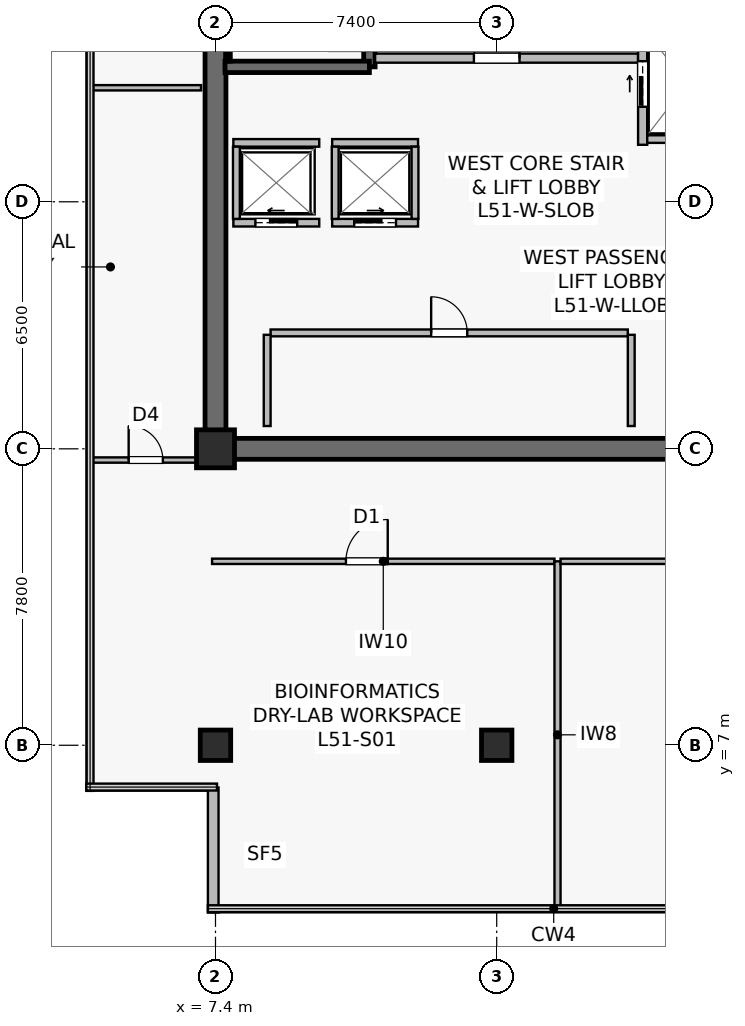
"""IFC4 building model, lengths in metres.
Left out: names, types, materials, properties, quantities, classifications, styles, units other than length and angle.
Written with IfcOpenShell. Run it as: python <this file> out.ifc"""

import sys

from ifc_helpers import new_model, si_unit, direction, frame, frame_2d, origin, origin_2d, place, context, subcontext, project, spatial, rectangle, extrude, source, transform, mapped, element, fill, save


model = new_model("IFC4")
c1 = context("Model", 3, precision=1e-05, world=origin(), true_north=direction((0.0, 1.0)))
c2 = subcontext(c1, "Body", "Model", "MODEL_VIEW")
j1 = project(units=[si_unit("LENGTHUNIT", "METRE"), si_unit("PLANEANGLEUNIT", "RADIAN")], contexts=[c1])
p1 = place(None, origin())
s1 = spatial("IfcSite", under=j1, at=p1, CompositionType="ELEMENT")
p2 = place(p1, origin())
s2 = spatial("IfcBuilding", under=s1, at=p2, CompositionType="ELEMENT")
p3 = place(p2, frame((0.0, 0.0, 213.7)))
s3 = spatial("IfcBuildingStorey", under=s2, at=p3, CompositionType="ELEMENT", Elevation=213.7)
p4 = place(p3, frame((7.125, 14.8, 0.0), z_axis=(0.0, 0.0, 1.0), x_axis=(1.0, 0.0, 0.0)))
e1 = element("IfcWall", 1, at=p4, inside=s3, PredefinedType="SHEAR", context=c2, shape_type="SweptSolid", body=[
    extrude(rectangle(XDim=15.35, YDim=0.55, at=frame_2d((7.675, 0.0))), origin(), (0.0, 0.0, 1.0), 3.8),
])
p5 = place(p3, frame((7.4, 15.075, 0.0), z_axis=(0.0, 0.0, 1.0), x_axis=(0.0, 1.0, 0.0)))
e2 = element("IfcWall", 2, at=p5, inside=s3, PredefinedType="SHEAR", context=c2, shape_type="SweptSolid", body=[
    extrude(rectangle(XDim=18.45, YDim=0.55, at=frame_2d((9.225, 0.0))), origin(), (0.0, 0.0, 1.0), 3.8),
])
p6 = place(p3, frame((11.45, 24.85, 0.0), z_axis=(0.0, 0.0, 1.0), x_axis=(0.0, 1.0, 0.0)))
e3 = element("IfcWall", 3, at=p6, inside=s3, PredefinedType="SHEAR", context=c2, shape_type="SweptSolid", body=[
    extrude(rectangle(XDim=8.63, YDim=0.3, at=frame_2d((4.315, 0.0))), origin(), (0.0, 0.0, 1.0), 3.8),
])
p7 = place(p6, frame((0.42, 0.0, 0.0)))
e4 = element("IfcOpeningElement", 4, at=p7, cuts=e3, PredefinedType="OPENING", context=c2, shape_type="SweptSolid", body=[
    extrude(rectangle(XDim=1.1, YDim=2.15, at=frame_2d((0.55, 1.075))), frame((0.0, 0.16, 0.0), z_axis=(0.0, -1.0, 0.0), x_axis=(1.0, 0.0, 0.0)), (0.0, 0.0, 1.0), 0.32),
])
p8 = place(p3, frame((7.65, 24.85, 0.0), z_axis=(0.0, 0.0, 1.0), x_axis=(1.0, 0.0, 0.0)))
e5 = element("IfcWall", 5, at=p8, inside=s3, PredefinedType="SHEAR", context=c2, shape_type="SweptSolid", body=[
    extrude(rectangle(XDim=3.8, YDim=0.3, at=frame_2d((1.9, 0.0))), origin(), (0.0, 0.0, 1.0), 3.8),
])
p9 = place(p3, frame((7.73, 25.0, 0.0), z_axis=(0.0, 0.0, 1.0), x_axis=(0.0, 1.0, 0.0)))
e6 = element("IfcWall", 6, at=p9, inside=s3, PredefinedType="SOLIDWALL", context=c2, shape_type="SweptSolid", body=[
    extrude(rectangle(XDim=8.32, YDim=0.12, at=frame_2d((4.16, 0.0))), origin(), (0.0, 0.0, 1.0), 3.8),
])
m1 = source(origin(), c2, "Body", "SweptSolid", [
    extrude(rectangle(XDim=0.8, YDim=0.8, at=origin_2d()), origin(), (0.0, 0.0, 1.0), 4.1),
])
p10 = place(p3, frame((14.8, 7.0, 0.0), z_axis=(0.0, 0.0, 1.0), x_axis=(1.0, 0.0, 0.0)))
e7 = element("IfcColumn", 7, at=p10, inside=s3, PredefinedType="COLUMN", context=c2, shape_type="MappedRepresentation", body=[
    mapped(m1, transform((0.0, 0.0, 0.0), scale=1.0)),
])
m2 = source(origin(), c2, "Body", "SweptSolid", [
    extrude(rectangle(XDim=1.0, YDim=1.0, at=origin_2d()), origin(), (0.0, 0.0, 1.0), 4.1),
])
p11 = place(p3, frame((7.4, 14.8, 0.0), z_axis=(0.0, 0.0, 1.0), x_axis=(1.0, 0.0, 0.0)))
e8 = element("IfcColumn", 8, at=p11, inside=s3, PredefinedType="COLUMN", context=c2, shape_type="MappedRepresentation", body=[
    mapped(m2, transform((0.0, 0.0, 0.0), scale=1.0)),
])
p12 = place(p3, frame((7.4, 7.0, 0.0), z_axis=(0.0, 0.0, 1.0), x_axis=(1.0, 0.0, 0.0)))
e9 = element("IfcColumn", 9, at=p12, inside=s3, PredefinedType="COLUMN", context=c2, shape_type="MappedRepresentation", body=[
    mapped(m1, transform((0.0, 0.0, 0.0), scale=1.0)),
])
p13 = place(p3, frame((7.34, 5.888, 0.0), z_axis=(0.0, 0.0, 1.0), x_axis=(0.0, -1.0, 0.0)))
e10 = element("IfcWall", 10, at=p13, inside=s3, PredefinedType="STANDARD", context=c2, shape_type="SweptSolid", body=[
    extrude(rectangle(XDim=3.288, YDim=0.28, at=frame_2d((1.644, 0.0))), origin(), (0.0, 0.0, 1.0), 3.8),
])
p14 = place(p3, frame((11.6, 25.08, 0.0), z_axis=(0.0, 0.0, 1.0), x_axis=(1.0, 0.0, 0.0)))
e11 = element("IfcWall", 11, at=p14, inside=s3, PredefinedType="SOLIDWALL", context=c2, shape_type="SweptSolid", body=[
    extrude(rectangle(XDim=6.92, YDim=0.24, at=frame_2d((3.46, 0.0))), origin(), (0.0, 0.0, 1.0), 3.197),
])
p15 = place(p14, frame((2.6, 0.0, 0.0)))
e12 = element("IfcOpeningElement", 12, at=p15, cuts=e11, PredefinedType="OPENING", context=c2, shape_type="SweptSolid", body=[
    extrude(rectangle(XDim=1.2, YDim=2.16, at=frame_2d((0.6, 1.08))), frame((0.0, 0.13, 0.0), z_axis=(0.0, -1.0, 0.0), x_axis=(1.0, 0.0, 0.0)), (0.0, 0.0, 1.0), 0.26),
])
p16 = place(p3, frame((18.64, 22.8, 0.0), z_axis=(0.0, 0.0, 1.0), x_axis=(0.0, 1.0, 0.0)))
e13 = element("IfcWall", 13, at=p16, inside=s3, PredefinedType="SOLIDWALL", context=c2, shape_type="SweptSolid", body=[
    extrude(rectangle(XDim=6.85, YDim=0.24, at=frame_2d((3.425, 0.0))), origin(), (0.0, 0.0, 1.0), 2.935),
])
p17 = place(p16, frame((4.85, 0.0, 0.0)))
e14 = element("IfcOpeningElement", 14, at=p17, cuts=e13, PredefinedType="OPENING", context=c2, shape_type="SweptSolid", body=[
    extrude(rectangle(XDim=1.1, YDim=2.22, at=frame_2d((0.55, 1.11))), frame((0.0, 0.13, 0.0), z_axis=(0.0, -1.0, 0.0), x_axis=(1.0, 0.0, 0.0)), (0.0, 0.0, 1.0), 0.26),
])
p18 = place(p16, frame((1.0, 0.0, 0.0)))
e15 = element("IfcOpeningElement", 15, at=p18, cuts=e13, PredefinedType="OPENING", context=c2, shape_type="SweptSolid", body=[
    extrude(rectangle(XDim=1.2, YDim=2.22, at=frame_2d((0.6, 1.11))), frame((0.0, 0.13, 0.0), z_axis=(0.0, -1.0, 0.0), x_axis=(1.0, 0.0, 0.0)), (0.0, 0.0, 1.0), 0.26),
])
p19 = place(p3, frame((7.87, 20.75, 0.0), z_axis=(0.0, 0.0, 1.0), x_axis=(1.0, 0.0, 0.0)))
e16 = element("IfcWall", 16, at=p19, inside=s3, PredefinedType="SOLIDWALL", context=c2, shape_type="SweptSolid", body=[
    extrude(rectangle(XDim=2.26, YDim=0.2, at=frame_2d((1.13, 0.0))), origin(), (0.0, 0.0, 1.0), 3.8),
])
p20 = place(p19, frame((0.58, 0.0, 0.0)))
e17 = element("IfcOpeningElement", 17, at=p20, cuts=e16, PredefinedType="OPENING", context=c2, shape_type="SweptSolid", body=[
    extrude(rectangle(XDim=1.1, YDim=2.22, at=frame_2d((0.55, 1.11))), frame((0.0, 0.11, 0.0), z_axis=(0.0, -1.0, 0.0), x_axis=(1.0, 0.0, 0.0)), (0.0, 0.0, 1.0), 0.22),
])
p21 = place(p3, frame((7.87, 22.85, 0.0), z_axis=(0.0, 0.0, 1.0), x_axis=(1.0, 0.0, 0.0)))
e18 = element("IfcWall", 18, at=p21, inside=s3, PredefinedType="SOLIDWALL", context=c2, shape_type="SweptSolid", body=[
    extrude(rectangle(XDim=2.26, YDim=0.2, at=frame_2d((1.13, 0.0))), origin(), (0.0, 0.0, 1.0), 3.8),
])
p22 = place(p3, frame((7.95, 20.85, 0.0), z_axis=(0.0, 0.0, 1.0), x_axis=(0.0, 1.0, 0.0)))
e19 = element("IfcWall", 19, at=p22, inside=s3, PredefinedType="SOLIDWALL", context=c2, shape_type="SweptSolid", body=[
    extrude(rectangle(XDim=1.9, YDim=0.18, at=frame_2d((0.95, 0.0))), origin(), (0.0, 0.0, 1.0), 3.8),
])
p23 = place(p3, frame((10.47, 20.75, 0.0), z_axis=(0.0, 0.0, 1.0), x_axis=(1.0, 0.0, 0.0)))
e20 = element("IfcWall", 20, at=p23, inside=s3, PredefinedType="SOLIDWALL", context=c2, shape_type="SweptSolid", body=[
    extrude(rectangle(XDim=2.26, YDim=0.2, at=frame_2d((1.13, 0.0))), origin(), (0.0, 0.0, 1.0), 3.8),
])
p24 = place(p23, frame((0.58, 0.0, 0.0)))
e21 = element("IfcOpeningElement", 21, at=p24, cuts=e20, PredefinedType="OPENING", context=c2, shape_type="SweptSolid", body=[
    extrude(rectangle(XDim=1.1, YDim=2.22, at=frame_2d((0.55, 1.11))), frame((0.0, 0.11, 0.0), z_axis=(0.0, -1.0, 0.0), x_axis=(1.0, 0.0, 0.0)), (0.0, 0.0, 1.0), 0.22),
])
p25 = place(p3, frame((10.47, 22.85, 0.0), z_axis=(0.0, 0.0, 1.0), x_axis=(1.0, 0.0, 0.0)))
e22 = element("IfcWall", 22, at=p25, inside=s3, PredefinedType="SOLIDWALL", context=c2, shape_type="SweptSolid", body=[
    extrude(rectangle(XDim=2.26, YDim=0.2, at=frame_2d((1.13, 0.0))), origin(), (0.0, 0.0, 1.0), 3.8),
])
for number, where, z_axis, x_axis in (
    (23, (10.55, 20.85, 0.0), (0.0, 0.0, 1.0), (0.0, 1.0, 0.0)),
    (24, (12.65, 20.85, 0.0), (0.0, 0.0, 1.0), (0.0, 1.0, 0.0)),
):
    element("IfcWall", number, at=place(p3, frame(where, z_axis=z_axis, x_axis=x_axis)), inside=s3, PredefinedType="SOLIDWALL", context=c2, shape_type="SweptSolid", body=[
        extrude(rectangle(XDim=1.9, YDim=0.18, at=frame_2d((0.95, 0.0))), origin(), (0.0, 0.0, 1.0), 3.8),
    ])
p26 = place(p3, frame((18.76, 22.95, 0.0), z_axis=(0.0, 0.0, 1.0), x_axis=(1.0, 0.0, 0.0)))
e25 = element("IfcWall", 25, at=p26, inside=s3, PredefinedType="SOLIDWALL", context=c2, shape_type="SweptSolid", body=[
    extrude(rectangle(XDim=2.19, YDim=0.2, at=frame_2d((1.095, 0.0))), origin(), (0.0, 0.0, 1.0), 3.8),
])
p27 = place(p3, frame((8.85, 17.85, 0.0), z_axis=(0.0, 0.0, 1.0), x_axis=(1.0, 0.0, 0.0)))
e26 = element("IfcWall", 26, at=p27, inside=s3, PredefinedType="SOLIDWALL", context=c2, shape_type="SweptSolid", body=[
    extrude(rectangle(XDim=9.4, YDim=0.18, at=frame_2d((4.7, 0.0))), origin(), (0.0, 0.0, 1.0), 3.197),
])
p28 = place(p27, frame((4.225, 0.0, 0.0)))
e27 = element("IfcOpeningElement", 27, at=p28, cuts=e26, PredefinedType="OPENING", context=c2, shape_type="SweptSolid", body=[
    extrude(rectangle(XDim=0.95, YDim=2.15, at=frame_2d((0.475, 1.075))), frame((0.0, 0.1, 0.0), z_axis=(0.0, -1.0, 0.0), x_axis=(1.0, 0.0, 0.0)), (0.0, 0.0, 1.0), 0.2),
])
for number, where, z_axis, x_axis in (
    (28, (18.34, 15.4, 0.0), (0.0, 0.0, 1.0), (0.0, 1.0, 0.0)),
    (29, (8.76, 15.4, 0.0), (0.0, 0.0, 1.0), (0.0, 1.0, 0.0)),
):
    element("IfcWall", number, at=place(p3, frame(where, z_axis=z_axis, x_axis=x_axis)), inside=s3, PredefinedType="SOLIDWALL", context=c2, shape_type="SweptSolid", body=[
        extrude(rectangle(XDim=2.4, YDim=0.18, at=frame_2d((1.2, 0.0))), origin(), (0.0, 0.0, 1.0), 3.8),
    ])
p29 = place(p3, frame((7.31, 11.84, 0.0), z_axis=(0.0, 0.0, 1.0), x_axis=(1.0, 0.0, 0.0)))
e30 = element("IfcWall", 30, at=p29, inside=s3, PredefinedType="PARTITIONING", context=c2, shape_type="SweptSolid", body=[
    extrude(rectangle(XDim=9.01, YDim=0.14, at=frame_2d((4.505, 0.0))), origin(), (0.0, 0.0, 1.0), 3.197),
])
p30 = place(p29, frame((3.522, 0.0, 0.0)))
e31 = element("IfcOpeningElement", 31, at=p30, cuts=e30, PredefinedType="OPENING", context=c2, shape_type="SweptSolid", body=[
    extrude(rectangle(XDim=1.1, YDim=2.18, at=frame_2d((0.55, 1.09))), frame((0.0, 0.08, 0.0), z_axis=(0.0, -1.0, 0.0), x_axis=(1.0, 0.0, 0.0)), (0.0, 0.0, 1.0), 0.16),
])
p31 = place(p3, frame((16.4, 2.71, 0.0), z_axis=(0.0, 0.0, 1.0), x_axis=(0.0, 1.0, 0.0)))
e32 = element("IfcWall", 32, at=p31, inside=s3, PredefinedType="PARTITIONING", context=c2, shape_type="SweptSolid", body=[
    extrude(rectangle(XDim=9.13, YDim=0.16, at=frame_2d((4.565, 0.0))), origin(), (0.0, 0.0, 1.0), 3.135),
])
p32 = place(p3, frame((16.48, 11.84, 0.0), z_axis=(0.0, 0.0, 1.0), x_axis=(1.0, 0.0, 0.0)))
e33 = element("IfcWall", 33, at=p32, inside=s3, PredefinedType="PARTITIONING", context=c2, shape_type="SweptSolid", body=[
    extrude(rectangle(XDim=18.64, YDim=0.14, at=frame_2d((9.32, 0.0))), origin(), (0.0, 0.0, 1.0), 3.197),
])
p33 = place(p32, frame((9.781, 0.0, 0.0)))
e34 = element("IfcOpeningElement", 34, at=p33, cuts=e33, PredefinedType="OPENING", context=c2, shape_type="SweptSolid", body=[
    extrude(rectangle(XDim=1.1, YDim=2.18, at=frame_2d((0.55, 1.09))), frame((0.0, 0.08, 0.0), z_axis=(0.0, -1.0, 0.0), x_axis=(1.0, 0.0, 0.0)), (0.0, 0.0, 1.0), 0.16),
])
p34 = place(p3, frame((4.11, 24.3, 0.0), z_axis=(0.0, 0.0, 1.0), x_axis=(1.0, 0.0, 0.0)))
e35 = element("IfcWall", 35, at=p34, inside=s3, PredefinedType="PARTITIONING", context=c2, shape_type="SweptSolid", body=[
    extrude(rectangle(XDim=2.91, YDim=0.14, at=frame_2d((1.455, 0.0))), origin(), (0.0, 0.0, 1.0), 3.8),
])
p35 = place(p3, frame((4.11, 14.505, 0.0), z_axis=(0.0, 0.0, 1.0), x_axis=(1.0, 0.0, 0.0)))
e36 = element("IfcWall", 36, at=p35, inside=s3, PredefinedType="PARTITIONING", context=c2, shape_type="SweptSolid", body=[
    extrude(rectangle(XDim=2.91, YDim=0.14, at=frame_2d((1.455, 0.0))), origin(), (0.0, 0.0, 1.0), 3.8),
])
p36 = place(p35, frame((1.005, 0.0, 0.0)))
e37 = element("IfcOpeningElement", 37, at=p36, cuts=e36, PredefinedType="OPENING", context=c2, shape_type="SweptSolid", body=[
    extrude(rectangle(XDim=0.9, YDim=2.1, at=frame_2d((0.45, 1.05))), frame((0.0, 0.08, 0.0), z_axis=(0.0, -1.0, 0.0), x_axis=(1.0, 0.0, 0.0)), (0.0, 0.0, 1.0), 0.16),
])
m3 = source(origin(), c2, "Body", "SweptSolid", [
    extrude(rectangle(XDim=1.2, YDim=2.16, at=frame_2d((0.6, 1.08))), frame((0.0, 0.025, 0.0), z_axis=(0.0, -1.0, 0.0), x_axis=(1.0, 0.0, 0.0)), (0.0, 0.0, 1.0), 0.05),
])
p37 = place(p15, origin())
e38 = element("IfcDoor", 38, at=p37, inside=s3, OperationType="SINGLE_SWING_RIGHT", PredefinedType="DOOR", context=c2, shape_type="MappedRepresentation", body=[
    mapped(m3, transform((0.0, 0.0, 0.0), scale=1.0)),
])
fill(e12, e38)
m4 = source(origin(), c2, "Body", "SweptSolid", [
    extrude(rectangle(XDim=1.1, YDim=2.22, at=frame_2d((0.55, 1.11))), frame((0.0, 0.025, 0.0), z_axis=(0.0, -1.0, 0.0), x_axis=(1.0, 0.0, 0.0)), (0.0, 0.0, 1.0), 0.05),
])
p38 = place(p20, origin())
e39 = element("IfcDoor", 39, at=p38, inside=s3, OperationType="SLIDING_TO_LEFT", PredefinedType="USERDEFINED", context=c2, shape_type="MappedRepresentation", body=[
    mapped(m4, transform((0.0, 0.0, 0.0), scale=1.0)),
])
fill(e17, e39)
p39 = place(p24, origin())
e40 = element("IfcDoor", 40, at=p39, inside=s3, OperationType="SLIDING_TO_RIGHT", PredefinedType="USERDEFINED", context=c2, shape_type="MappedRepresentation", body=[
    mapped(m4, transform((0.0, 0.0, 0.0), scale=1.0)),
])
fill(e21, e40)
m5 = source(origin(), c2, "Body", "SweptSolid", [
    extrude(rectangle(XDim=1.2, YDim=2.22, at=frame_2d((0.6, 1.11))), frame((0.0, 0.025, 0.0), z_axis=(0.0, -1.0, 0.0), x_axis=(1.0, 0.0, 0.0)), (0.0, 0.0, 1.0), 0.05),
])
p40 = place(p18, origin())
e41 = element("IfcDoor", 41, at=p40, inside=s3, OperationType="SLIDING_TO_RIGHT", PredefinedType="USERDEFINED", context=c2, shape_type="MappedRepresentation", body=[
    mapped(m5, transform((0.0, 0.0, 0.0), scale=1.0)),
])
fill(e15, e41)
m6 = source(origin(), c2, "Body", "SweptSolid", [
    extrude(rectangle(XDim=0.95, YDim=2.15, at=frame_2d((0.475, 1.075))), frame((0.0, 0.025, 0.0), z_axis=(0.0, -1.0, 0.0), x_axis=(1.0, 0.0, 0.0)), (0.0, 0.0, 1.0), 0.05),
])
p41 = place(p28, origin())
e42 = element("IfcDoor", 42, at=p41, inside=s3, OperationType="SINGLE_SWING_LEFT", PredefinedType="DOOR", context=c2, shape_type="MappedRepresentation", body=[
    mapped(m6, transform((0.0, 0.0, 0.0), scale=1.0)),
])
fill(e27, e42)
m7 = source(origin(), c2, "Body", "SweptSolid", [
    extrude(rectangle(XDim=1.1, YDim=2.18, at=frame_2d((0.55, 1.09))), frame((0.0, 0.025, 0.0), z_axis=(0.0, -1.0, 0.0), x_axis=(1.0, 0.0, 0.0)), (0.0, 0.0, 1.0), 0.05),
])
p42 = place(p30, origin())
e43 = element("IfcDoor", 43, at=p42, inside=s3, OperationType="SINGLE_SWING_RIGHT", PredefinedType="DOOR", context=c2, shape_type="MappedRepresentation", body=[
    mapped(m7, transform((0.0, 0.0, 0.0), scale=1.0)),
])
fill(e31, e43)
m8 = source(origin(), c2, "Body", "SweptSolid", [
    extrude(rectangle(XDim=0.9, YDim=2.1, at=frame_2d((0.45, 1.05))), frame((0.0, 0.025, 0.0), z_axis=(0.0, -1.0, 0.0), x_axis=(1.0, 0.0, 0.0)), (0.0, 0.0, 1.0), 0.05),
])
p43 = place(p36, origin())
e44 = element("IfcDoor", 44, at=p43, inside=s3, OperationType="SINGLE_SWING_LEFT", PredefinedType="DOOR", context=c2, shape_type="MappedRepresentation", body=[
    mapped(m8, transform((0.0, 0.0, 0.0), scale=1.0)),
])
fill(e37, e44)
save(model, sys.argv[1])
